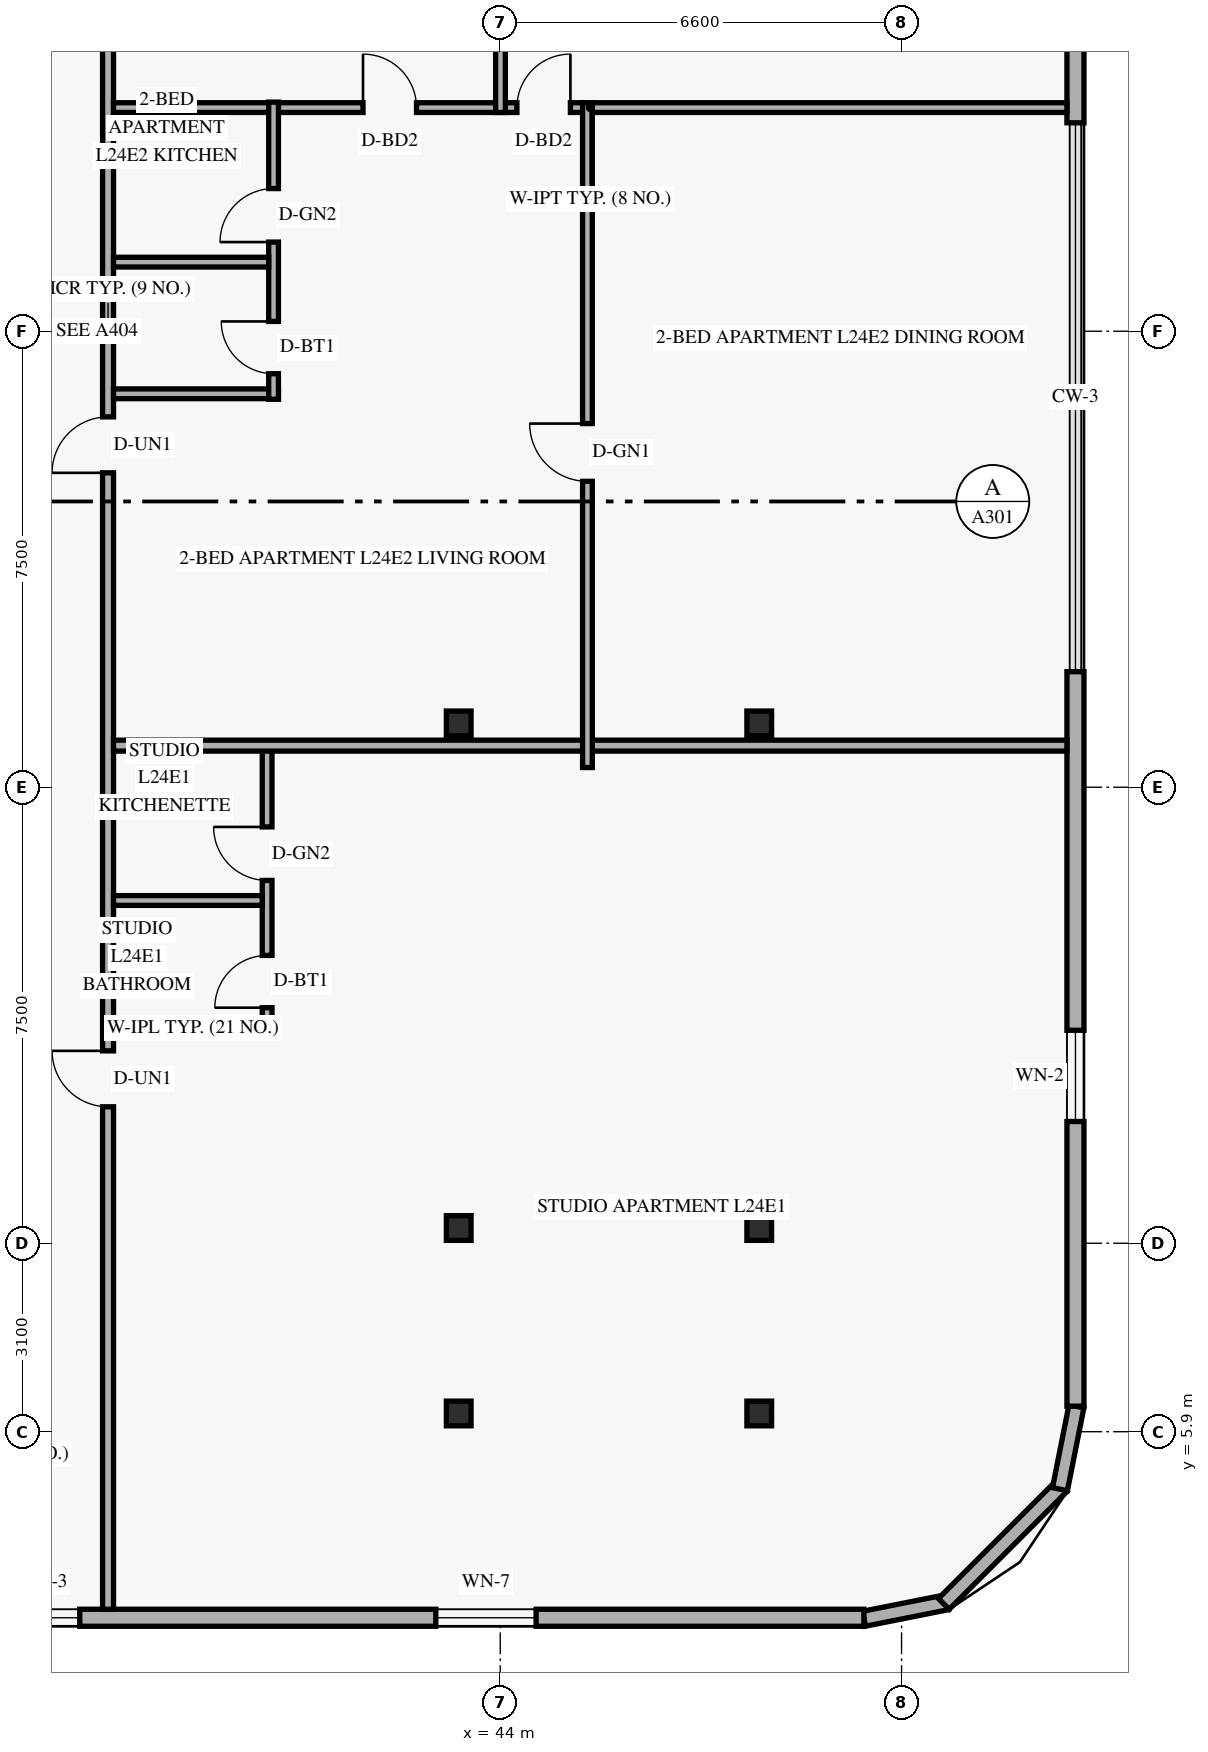
"""IFC4 building model, lengths in metres.
Left out: names, types, materials, properties, quantities, classifications, styles, units other than length and angle.
Written with IfcOpenShell. Run it as: python <this file> out.ifc"""

import sys

from ifc_helpers import new_model, si_unit, direction, frame, frame_2d, origin, origin_2d, place, context, subcontext, project, spatial, rectangle, hollow_rectangle, extrude, element, fill, save


model = new_model("IFC4")
c1 = context("Model", 3, precision=1e-05, world=origin(), true_north=direction((0.0, 1.0)))
c2 = subcontext(c1, "Body", "Model", "MODEL_VIEW")
j1 = project(units=[si_unit("LENGTHUNIT", "METRE"), si_unit("PLANEANGLEUNIT", "RADIAN")], contexts=[c1])
p1 = place(None, origin())
s1 = spatial("IfcSite", under=j1, at=p1, CompositionType="ELEMENT")
p2 = place(p1, origin())
s2 = spatial("IfcBuilding", under=s1, at=p2, CompositionType="ELEMENT")
p3 = place(p2, frame((0.0, 0.0, 94.8)))
s3 = spatial("IfcBuildingStorey", under=s2, at=p3, CompositionType="ELEMENT", Elevation=94.8)
for number, where, z_axis, x_axis in (
    (1, (43.254, 6.2, 0.0), (0.035, 0.0, 0.999), (0.0, 1.0, 0.0)),
    (2, (43.254, 9.25, 0.0), (0.035, 0.0, 0.999), (0.0, 1.0, 0.0)),
    (3, (43.254, 17.55, 0.0), (0.035, 0.0, 0.999), (0.0, 1.0, 0.0)),
):
    element("IfcColumn", number, at=place(p3, frame(where, z_axis=z_axis, x_axis=x_axis)), inside=s3, PredefinedType="COLUMN", context=c2, shape_type="SweptSolid", body=[
        extrude(hollow_rectangle(XDim=0.406, YDim=0.406, WallThickness=0.016, at=origin_2d()), origin(), (0.0, 0.0, 1.0), 3.602),
    ])
for number, where, z_axis, x_axis in (
    (4, (48.155, 6.2, 0.0), (0.058, 0.0, 0.998), (0.0, 1.0, 0.0)),
    (5, (48.155, 9.25, 0.0), (0.058, 0.0, 0.998), (0.0, 1.0, 0.0)),
    (6, (48.155, 17.55, 0.0), (0.058, 0.0, 0.998), (0.0, 1.0, 0.0)),
):
    element("IfcColumn", number, at=place(p3, frame(where, z_axis=z_axis, x_axis=x_axis)), inside=s3, PredefinedType="COLUMN", context=c2, shape_type="SweptSolid", body=[
        extrude(hollow_rectangle(XDim=0.406, YDim=0.406, WallThickness=0.016, at=origin_2d()), origin(), (0.0, 0.0, 1.0), 3.606),
    ])
p4 = place(p3, frame((49.983, 2.824, 0.0), z_axis=(0.0, 0.0, 1.0), x_axis=(0.980809899341, 0.19496651342, 0.0)))
e7 = element("IfcWall", 7, at=p4, inside=s3, PredefinedType="SOLIDWALL", context=c2, shape_type="SweptSolid", body=[
    extrude(rectangle(XDim=1.389, YDim=0.25, at=frame_2d((0.694, 0.0))), origin(), (0.0, 0.0, 1.0), 3.35),
])
p5 = place(p3, frame((51.295, 3.068, 0.0), z_axis=(0.0, 0.0, 1.0), x_axis=(0.707151344399, 0.707062215165, 0.0)))
e8 = element("IfcWall", 8, at=p5, inside=s3, PredefinedType="SOLIDWALL", context=c2, shape_type="SweptSolid", body=[
    extrude(rectangle(XDim=2.739, YDim=0.25, at=frame_2d((1.37, 0.0))), origin(), (0.0, 0.0, 1.0), 3.35),
])
p6 = place(p3, frame((53.205, 4.955, 0.0), z_axis=(0.0, 0.0, 1.0), x_axis=(0.195000137217, 0.980803214965, 0.0)))
e9 = element("IfcWall", 9, at=p6, inside=s3, PredefinedType="SOLIDWALL", context=c2, shape_type="SweptSolid", body=[
    extrude(rectangle(XDim=1.388, YDim=0.25, at=frame_2d((0.694, 0.0))), origin(), (0.0, 0.0, 1.0), 3.35),
])
p7 = place(p3, frame((13.42, 2.84, 0.0), z_axis=(0.0, 0.0, 1.0), x_axis=(1.0, 0.0, 0.0)))
e10 = element("IfcWall", 10, at=p7, inside=s3, PredefinedType="SOLIDWALL", context=c2, shape_type="SweptSolid", body=[
    extrude(rectangle(XDim=36.56, YDim=0.28, at=frame_2d((18.28, 0.0))), origin(), (0.0, 0.0, 1.0), 3.35),
])
p8 = place(p7, frame((3.29, 0.0, 0.85)))
e11 = element("IfcOpeningElement", 11, at=p8, cuts=e10, PredefinedType="OPENING", context=c2, shape_type="SweptSolid", body=[
    extrude(rectangle(XDim=1.65, YDim=1.6, at=frame_2d((0.825, 0.8))), frame((0.0, 0.15, 0.0), z_axis=(0.0, -1.0, 0.0), x_axis=(1.0, 0.0, 0.0)), (0.0, 0.0, 1.0), 0.3),
])
p9 = place(p7, frame((8.68, 0.0, 0.85)))
e12 = element("IfcOpeningElement", 12, at=p9, cuts=e10, PredefinedType="OPENING", context=c2, shape_type="SweptSolid", body=[
    extrude(rectangle(XDim=1.2, YDim=1.5, at=frame_2d((0.6, 0.75))), frame((0.0, 0.15, 0.0), z_axis=(0.0, -1.0, 0.0), x_axis=(1.0, 0.0, 0.0)), (0.0, 0.0, 1.0), 0.3),
])
p10 = place(p7, frame((12.248, 0.0, 0.85)))
e13 = element("IfcOpeningElement", 13, at=p10, cuts=e10, PredefinedType="OPENING", context=c2, shape_type="SweptSolid", body=[
    extrude(rectangle(XDim=1.65, YDim=1.6, at=frame_2d((0.825, 0.8))), frame((0.0, 0.15, 0.0), z_axis=(0.0, -1.0, 0.0), x_axis=(1.0, 0.0, 0.0)), (0.0, 0.0, 1.0), 0.3),
])
p11 = place(p7, frame((18.083, 0.0, 0.85)))
e14 = element("IfcOpeningElement", 14, at=p11, cuts=e10, PredefinedType="OPENING", context=c2, shape_type="SweptSolid", body=[
    extrude(rectangle(XDim=1.65, YDim=1.6, at=frame_2d((0.825, 0.8))), frame((0.0, 0.15, 0.0), z_axis=(0.0, -1.0, 0.0), x_axis=(1.0, 0.0, 0.0)), (0.0, 0.0, 1.0), 0.3),
])
p12 = place(p7, frame((22.465, 0.0, 0.85)))
e15 = element("IfcOpeningElement", 15, at=p12, cuts=e10, PredefinedType="OPENING", context=c2, shape_type="SweptSolid", body=[
    extrude(rectangle(XDim=1.2, YDim=1.5, at=frame_2d((0.6, 0.75))), frame((0.0, 0.15, 0.0), z_axis=(0.0, -1.0, 0.0), x_axis=(1.0, 0.0, 0.0)), (0.0, 0.0, 1.0), 0.3),
])
p13 = place(p7, frame((29.52, 0.0, 0.85)))
e16 = element("IfcOpeningElement", 16, at=p13, cuts=e10, PredefinedType="OPENING", context=c2, shape_type="SweptSolid", body=[
    extrude(rectangle(XDim=1.65, YDim=1.6, at=frame_2d((0.825, 0.8))), frame((0.0, 0.15, 0.0), z_axis=(0.0, -1.0, 0.0), x_axis=(1.0, 0.0, 0.0)), (0.0, 0.0, 1.0), 0.3),
])
p14 = place(p3, frame((53.46, 6.32, 0.0), z_axis=(0.0, 0.0, 1.0), x_axis=(0.0, 1.0, 0.0)))
e17 = element("IfcWall", 17, at=p14, inside=s3, PredefinedType="SOLIDWALL", context=c2, shape_type="SweptSolid", body=[
    extrude(rectangle(XDim=12.08, YDim=0.28, at=frame_2d((6.04, 0.0))), origin(), (0.0, 0.0, 1.0), 3.35),
])
p15 = place(p14, frame((4.682, 0.0, 0.85)))
e18 = element("IfcOpeningElement", 18, at=p15, cuts=e17, PredefinedType="OPENING", context=c2, shape_type="SweptSolid", body=[
    extrude(rectangle(XDim=1.5, YDim=1.55, at=frame_2d((0.75, 0.775))), frame((0.0, 0.15, 0.0), z_axis=(0.0, -1.0, 0.0), x_axis=(1.0, 0.0, 0.0)), (0.0, 0.0, 1.0), 0.3),
])
p16 = place(p3, frame((53.46, 27.428, 0.0), z_axis=(0.0, 0.0, 1.0), x_axis=(0.0, 1.0, 0.0)))
e19 = element("IfcWall", 19, at=p16, inside=s3, PredefinedType="SOLIDWALL", context=c2, shape_type="SweptSolid", body=[
    extrude(rectangle(XDim=14.252, YDim=0.28, at=frame_2d((7.126, 0.0))), origin(), (0.0, 0.0, 1.0), 3.35),
])
p17 = place(p16, frame((1.37, 0.0, 0.85)))
e20 = element("IfcOpeningElement", 20, at=p17, cuts=e19, PredefinedType="OPENING", context=c2, shape_type="SweptSolid", body=[
    extrude(rectangle(XDim=1.5, YDim=1.55, at=frame_2d((0.75, 0.775))), frame((0.0, 0.15, 0.0), z_axis=(0.0, -1.0, 0.0), x_axis=(1.0, 0.0, 0.0)), (0.0, 0.0, 1.0), 0.3),
])
p18 = place(p16, frame((8.496, 0.0, 0.85)))
e21 = element("IfcOpeningElement", 21, at=p18, cuts=e19, PredefinedType="OPENING", context=c2, shape_type="SweptSolid", body=[
    extrude(rectangle(XDim=1.5, YDim=1.55, at=frame_2d((0.75, 0.775))), frame((0.0, 0.15, 0.0), z_axis=(0.0, -1.0, 0.0), x_axis=(1.0, 0.0, 0.0)), (0.0, 0.0, 1.0), 0.3),
])
p19 = place(p3, frame((37.55, 2.98, 0.0), z_axis=(0.0, 0.0, 1.0), x_axis=(0.0, 1.0, 0.0)))
e22 = element("IfcWall", 22, at=p19, inside=s3, PredefinedType="STANDARD", context=c2, shape_type="SweptSolid", body=[
    extrude(rectangle(XDim=42.04, YDim=0.18, at=frame_2d((21.02, 0.0))), origin(), (0.0, 0.0, 1.0), 2.721),
])
p20 = place(p19, frame((8.264, 0.0, 0.0)))
e23 = element("IfcOpeningElement", 23, at=p20, cuts=e22, PredefinedType="OPENING", context=c2, shape_type="SweptSolid", body=[
    extrude(rectangle(XDim=0.92, YDim=2.15, at=frame_2d((0.46, 1.075))), frame((0.0, 0.1, 0.0), z_axis=(0.0, -1.0, 0.0), x_axis=(1.0, 0.0, 0.0)), (0.0, 0.0, 1.0), 0.2),
])
p21 = place(p19, frame((18.691, 0.0, 0.0)))
e24 = element("IfcOpeningElement", 24, at=p21, cuts=e22, PredefinedType="OPENING", context=c2, shape_type="SweptSolid", body=[
    extrude(rectangle(XDim=0.92, YDim=2.15, at=frame_2d((0.46, 1.075))), frame((0.0, 0.1, 0.0), z_axis=(0.0, -1.0, 0.0), x_axis=(1.0, 0.0, 0.0)), (0.0, 0.0, 1.0), 0.2),
])
p22 = place(p19, frame((32.494, 0.0, 0.0)))
e25 = element("IfcOpeningElement", 25, at=p22, cuts=e22, PredefinedType="OPENING", context=c2, shape_type="SweptSolid", body=[
    extrude(rectangle(XDim=0.92, YDim=2.15, at=frame_2d((0.46, 1.075))), frame((0.0, 0.1, 0.0), z_axis=(0.0, -1.0, 0.0), x_axis=(1.0, 0.0, 0.0)), (0.0, 0.0, 1.0), 0.2),
])
p23 = place(p3, frame((37.64, 12.544, 0.0), z_axis=(0.0, 0.0, 1.0), x_axis=(1.0, 0.0, 0.0)))
e26 = element("IfcWall", 26, at=p23, inside=s3, PredefinedType="PLUMBINGWALL", context=c2, shape_type="SweptSolid", body=[
    extrude(rectangle(XDim=2.606, YDim=0.16, at=frame_2d((1.303, 0.0))), origin(), (0.0, 0.0, 1.0), 3.35),
])
p24 = place(p3, frame((40.166, 12.454, 0.0), z_axis=(0.0, 0.0, 1.0), x_axis=(0.0, 1.0, 0.0)))
e27 = element("IfcWall", 27, at=p24, inside=s3, PredefinedType="PLUMBINGWALL", context=c2, shape_type="SweptSolid", body=[
    extrude(rectangle(XDim=4.73, YDim=0.16, at=frame_2d((2.365, 0.0))), origin(), (0.0, 0.0, 1.0), 2.978),
])
p25 = place(p24, frame((0.42, 0.0, 0.0)))
e28 = element("IfcOpeningElement", 28, at=p25, cuts=e27, PredefinedType="OPENING", context=c2, shape_type="SweptSolid", body=[
    extrude(rectangle(XDim=0.86, YDim=2.12, at=frame_2d((0.43, 1.06))), frame((0.0, 0.09, 0.0), z_axis=(0.0, -1.0, 0.0), x_axis=(1.0, 0.0, 0.0)), (0.0, 0.0, 1.0), 0.18),
])
p26 = place(p24, frame((2.513, 0.0, 0.0)))
e29 = element("IfcOpeningElement", 29, at=p26, cuts=e27, PredefinedType="OPENING", context=c2, shape_type="SweptSolid", body=[
    extrude(rectangle(XDim=0.88, YDim=2.12, at=frame_2d((0.44, 1.06))), frame((0.0, 0.09, 0.0), z_axis=(0.0, -1.0, 0.0), x_axis=(1.0, 0.0, 0.0)), (0.0, 0.0, 1.0), 0.18),
])
p27 = place(p3, frame((37.64, 14.637, 0.0), z_axis=(0.0, 0.0, 1.0), x_axis=(1.0, 0.0, 0.0)))
e30 = element("IfcWall", 30, at=p27, inside=s3, PredefinedType="PLUMBINGWALL", context=c2, shape_type="SweptSolid", body=[
    extrude(rectangle(XDim=2.446, YDim=0.16, at=frame_2d((1.223, 0.0))), origin(), (0.0, 0.0, 1.0), 3.35),
])
p28 = place(p3, frame((37.64, 17.184, 0.0), z_axis=(0.0, 0.0, 1.0), x_axis=(1.0, 0.0, 0.0)))
e31 = element("IfcWall", 31, at=p28, inside=s3, PredefinedType="PARTITIONING", context=c2, shape_type="SweptSolid", body=[
    extrude(rectangle(XDim=15.68, YDim=0.18, at=frame_2d((7.84, 0.0))), origin(), (0.0, 0.0, 1.0), 2.721),
])
p29 = place(p3, frame((37.64, 27.678, 0.0), z_axis=(0.0, 0.0, 1.0), x_axis=(1.0, 0.0, 0.0)))
e32 = element("IfcWall", 32, at=p29, inside=s3, PredefinedType="PARTITIONING", context=c2, shape_type="SweptSolid", body=[
    extrude(rectangle(XDim=15.68, YDim=0.16, at=frame_2d((7.84, 0.0))), origin(), (0.0, 0.0, 1.0), 2.721),
])
p30 = place(p29, frame((4.103, 0.0, 0.0)))
e33 = element("IfcOpeningElement", 33, at=p30, cuts=e32, PredefinedType="OPENING", context=c2, shape_type="SweptSolid", body=[
    extrude(rectangle(XDim=0.88, YDim=2.14, at=frame_2d((0.44, 1.07))), frame((0.0, 0.09, 0.0), z_axis=(0.0, -1.0, 0.0), x_axis=(1.0, 0.0, 0.0)), (0.0, 0.0, 1.0), 0.18),
])
p31 = place(p29, frame((6.634, 0.0, 0.0)))
e34 = element("IfcOpeningElement", 34, at=p31, cuts=e32, PredefinedType="OPENING", context=c2, shape_type="SweptSolid", body=[
    extrude(rectangle(XDim=0.88, YDim=2.14, at=frame_2d((0.44, 1.07))), frame((0.0, 0.09, 0.0), z_axis=(0.0, -1.0, 0.0), x_axis=(1.0, 0.0, 0.0)), (0.0, 0.0, 1.0), 0.18),
])
p32 = place(p3, frame((37.64, 22.971, 0.0), z_axis=(0.0, 0.0, 1.0), x_axis=(1.0, 0.0, 0.0)))
e35 = element("IfcWall", 35, at=p32, inside=s3, PredefinedType="PLUMBINGWALL", context=c2, shape_type="SweptSolid", body=[
    extrude(rectangle(XDim=2.712, YDim=0.16, at=frame_2d((1.356, 0.0))), origin(), (0.0, 0.0, 1.0), 3.35),
])
p33 = place(p3, frame((40.272, 22.881, 0.0), z_axis=(0.0, 0.0, 1.0), x_axis=(0.0, 1.0, 0.0)))
e36 = element("IfcWall", 36, at=p33, inside=s3, PredefinedType="PLUMBINGWALL", context=c2, shape_type="SweptSolid", body=[
    extrude(rectangle(XDim=4.887, YDim=0.16, at=frame_2d((2.443, 0.0))), origin(), (0.0, 0.0, 1.0), 3.35),
])
p34 = place(p33, frame((0.42, 0.0, 0.0)))
e37 = element("IfcOpeningElement", 37, at=p34, cuts=e36, PredefinedType="OPENING", context=c2, shape_type="SweptSolid", body=[
    extrude(rectangle(XDim=0.86, YDim=2.12, at=frame_2d((0.43, 1.06))), frame((0.0, 0.09, 0.0), z_axis=(0.0, -1.0, 0.0), x_axis=(1.0, 0.0, 0.0)), (0.0, 0.0, 1.0), 0.18),
])
p35 = place(p33, frame((2.585, 0.0, 0.0)))
e38 = element("IfcOpeningElement", 38, at=p35, cuts=e36, PredefinedType="OPENING", context=c2, shape_type="SweptSolid", body=[
    extrude(rectangle(XDim=0.88, YDim=2.12, at=frame_2d((0.44, 1.06))), frame((0.0, 0.09, 0.0), z_axis=(0.0, -1.0, 0.0), x_axis=(1.0, 0.0, 0.0)), (0.0, 0.0, 1.0), 0.18),
])
p36 = place(p3, frame((37.64, 25.136, 0.0), z_axis=(0.0, 0.0, 1.0), x_axis=(1.0, 0.0, 0.0)))
e39 = element("IfcWall", 39, at=p36, inside=s3, PredefinedType="PLUMBINGWALL", context=c2, shape_type="SweptSolid", body=[
    extrude(rectangle(XDim=2.552, YDim=0.16, at=frame_2d((1.276, 0.0))), origin(), (0.0, 0.0, 1.0), 3.35),
])
p37 = place(p3, frame((45.434, 16.824, 0.0), z_axis=(0.0, 0.0, 1.0), x_axis=(0.0, 1.0, 0.0)))
e40 = element("IfcWall", 40, at=p37, inside=s3, PredefinedType="PARTITIONING", context=c2, shape_type="SweptSolid", body=[
    extrude(rectangle(XDim=10.934, YDim=0.16, at=frame_2d((5.467, 0.0))), origin(), (0.0, 0.0, 1.0), 2.721),
])
p38 = place(p37, frame((4.707, 0.0, 0.0)))
e41 = element("IfcOpeningElement", 41, at=p38, cuts=e40, PredefinedType="OPENING", context=c2, shape_type="SweptSolid", body=[
    extrude(rectangle(XDim=0.95, YDim=2.15, at=frame_2d((0.475, 1.075))), frame((0.0, 0.09, 0.0), z_axis=(0.0, -1.0, 0.0), x_axis=(1.0, 0.0, 0.0)), (0.0, 0.0, 1.0), 0.18),
])
p39 = place(p3, frame((44.004, 27.598, 0.0), z_axis=(0.0, 0.0, 1.0), x_axis=(0.0, 1.0, 0.0)))
e42 = element("IfcWall", 42, at=p39, inside=s3, PredefinedType="PARTITIONING", context=c2, shape_type="SweptSolid", body=[
    extrude(rectangle(XDim=4.46, YDim=0.16, at=frame_2d((2.23, 0.0))), origin(), (0.0, 0.0, 1.0), 2.721),
])
p40 = place(p12, origin())
e43 = element("IfcWindow", 43, at=p40, inside=s3, PartitioningType="SINGLE_PANEL", PredefinedType="WINDOW", context=c2, shape_type="SweptSolid", body=[
    extrude(rectangle(XDim=1.2, YDim=1.5, at=frame_2d((0.6, 0.75))), frame((0.0, 0.03, 0.0), z_axis=(0.0, -1.0, 0.0), x_axis=(1.0, 0.0, 0.0)), (0.0, 0.0, 1.0), 0.06),
])
fill(e15, e43)
p41 = place(p13, origin())
e44 = element("IfcWindow", 44, at=p41, inside=s3, PartitioningType="SINGLE_PANEL", PredefinedType="WINDOW", context=c2, shape_type="SweptSolid", body=[
    extrude(rectangle(XDim=1.65, YDim=1.6, at=frame_2d((0.825, 0.8))), frame((0.0, 0.03, 0.0), z_axis=(0.0, -1.0, 0.0), x_axis=(1.0, 0.0, 0.0)), (0.0, 0.0, 1.0), 0.06),
])
fill(e16, e44)
p42 = place(p15, origin())
e45 = element("IfcWindow", 45, at=p42, inside=s3, PartitioningType="SINGLE_PANEL", PredefinedType="WINDOW", context=c2, shape_type="SweptSolid", body=[
    extrude(rectangle(XDim=1.5, YDim=1.55, at=frame_2d((0.75, 0.775))), frame((0.0, 0.03, 0.0), z_axis=(0.0, -1.0, 0.0), x_axis=(1.0, 0.0, 0.0)), (0.0, 0.0, 1.0), 0.06),
])
fill(e18, e45)
p43 = place(p20, origin())
e46 = element("IfcDoor", 46, at=p43, inside=s3, OperationType="SINGLE_SWING_RIGHT", PredefinedType="DOOR", context=c2, shape_type="SweptSolid", body=[
    extrude(rectangle(XDim=0.92, YDim=2.15, at=frame_2d((0.46, 1.075))), frame((0.0, 0.025, 0.0), z_axis=(0.0, -1.0, 0.0), x_axis=(1.0, 0.0, 0.0)), (0.0, 0.0, 1.0), 0.05),
])
fill(e23, e46)
p44 = place(p25, origin())
e47 = element("IfcDoor", 47, at=p44, inside=s3, OperationType="SINGLE_SWING_LEFT", PredefinedType="DOOR", context=c2, shape_type="SweptSolid", body=[
    extrude(rectangle(XDim=0.86, YDim=2.12, at=frame_2d((0.43, 1.06))), frame((0.0, 0.025, 0.0), z_axis=(0.0, -1.0, 0.0), x_axis=(1.0, 0.0, 0.0)), (0.0, 0.0, 1.0), 0.05),
])
fill(e28, e47)
p45 = place(p26, origin())
e48 = element("IfcDoor", 48, at=p45, inside=s3, OperationType="SINGLE_SWING_RIGHT", PredefinedType="DOOR", context=c2, shape_type="SweptSolid", body=[
    extrude(rectangle(XDim=0.88, YDim=2.12, at=frame_2d((0.44, 1.06))), frame((0.0, 0.025, 0.0), z_axis=(0.0, -1.0, 0.0), x_axis=(1.0, 0.0, 0.0)), (0.0, 0.0, 1.0), 0.05),
])
fill(e29, e48)
p46 = place(p38, origin())
e49 = element("IfcDoor", 49, at=p46, inside=s3, OperationType="SINGLE_SWING_RIGHT", PredefinedType="DOOR", context=c2, shape_type="SweptSolid", body=[
    extrude(rectangle(XDim=0.95, YDim=2.15, at=frame_2d((0.475, 1.075))), frame((0.0, 0.025, 0.0), z_axis=(0.0, -1.0, 0.0), x_axis=(1.0, 0.0, 0.0)), (0.0, 0.0, 1.0), 0.05),
])
fill(e41, e49)
p47 = place(p21, origin())
e50 = element("IfcDoor", 50, at=p47, inside=s3, OperationType="SINGLE_SWING_LEFT", PredefinedType="DOOR", context=c2, shape_type="SweptSolid", body=[
    extrude(rectangle(XDim=0.92, YDim=2.15, at=frame_2d((0.46, 1.075))), frame((0.0, 0.025, 0.0), z_axis=(0.0, -1.0, 0.0), x_axis=(1.0, 0.0, 0.0)), (0.0, 0.0, 1.0), 0.05),
])
fill(e24, e50)
p48 = place(p34, origin())
e51 = element("IfcDoor", 51, at=p48, inside=s3, OperationType="SINGLE_SWING_RIGHT", PredefinedType="DOOR", context=c2, shape_type="SweptSolid", body=[
    extrude(rectangle(XDim=0.86, YDim=2.12, at=frame_2d((0.43, 1.06))), frame((0.0, 0.025, 0.0), z_axis=(0.0, -1.0, 0.0), x_axis=(1.0, 0.0, 0.0)), (0.0, 0.0, 1.0), 0.05),
])
fill(e37, e51)
p49 = place(p35, origin())
e52 = element("IfcDoor", 52, at=p49, inside=s3, OperationType="SINGLE_SWING_LEFT", PredefinedType="DOOR", context=c2, shape_type="SweptSolid", body=[
    extrude(rectangle(XDim=0.88, YDim=2.12, at=frame_2d((0.44, 1.06))), frame((0.0, 0.025, 0.0), z_axis=(0.0, -1.0, 0.0), x_axis=(1.0, 0.0, 0.0)), (0.0, 0.0, 1.0), 0.05),
])
fill(e38, e52)
p50 = place(p30, origin())
e53 = element("IfcDoor", 53, at=p50, inside=s3, OperationType="SINGLE_SWING_LEFT", PredefinedType="DOOR", context=c2, shape_type="SweptSolid", body=[
    extrude(rectangle(XDim=0.88, YDim=2.14, at=frame_2d((0.44, 1.07))), frame((0.0, 0.025, 0.0), z_axis=(0.0, -1.0, 0.0), x_axis=(1.0, 0.0, 0.0)), (0.0, 0.0, 1.0), 0.05),
])
fill(e33, e53)
p51 = place(p31, origin())
e54 = element("IfcDoor", 54, at=p51, inside=s3, OperationType="SINGLE_SWING_RIGHT", PredefinedType="DOOR", context=c2, shape_type="SweptSolid", body=[
    extrude(rectangle(XDim=0.88, YDim=2.14, at=frame_2d((0.44, 1.07))), frame((0.0, 0.025, 0.0), z_axis=(0.0, -1.0, 0.0), x_axis=(1.0, 0.0, 0.0)), (0.0, 0.0, 1.0), 0.05),
])
fill(e34, e54)
save(model, sys.argv[1])
